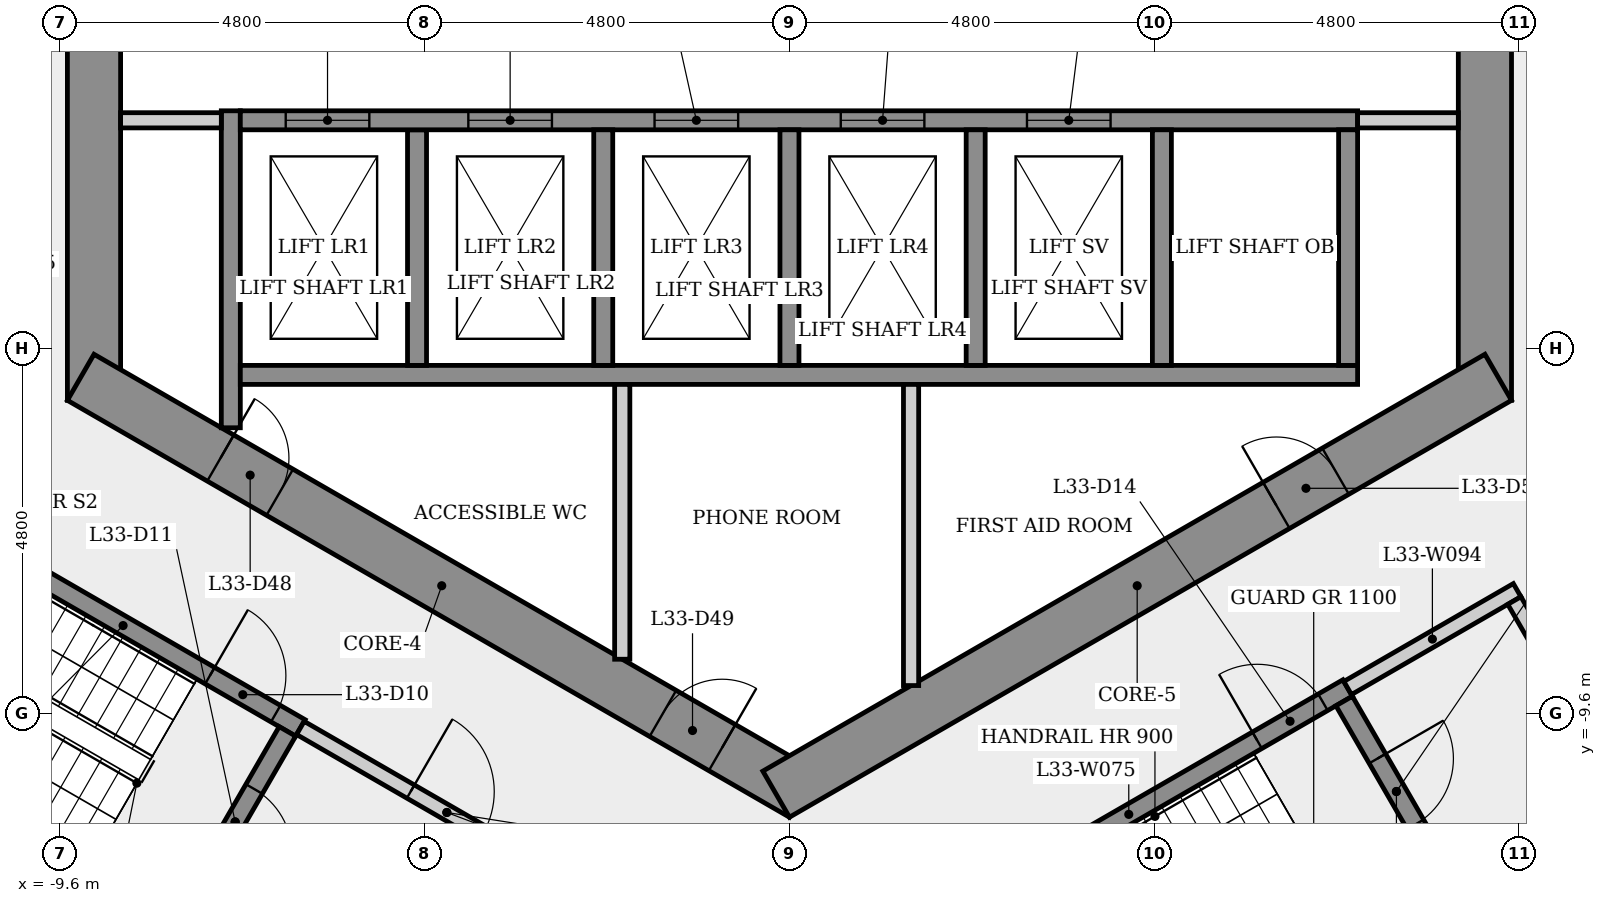
"""IFC4 building model, lengths in metres.
Left out: names, types, materials, properties, quantities, classifications, styles, units other than length and angle.
Written with IfcOpenShell. Run it as: python <this file> out.ifc"""

import sys

from ifc_helpers import new_model, si_unit, direction, frame, frame_2d, origin, place, context, subcontext, project, spatial, rectangle, extrude, element, fill, save


model = new_model("IFC4")
c1 = context("Model", 3, precision=1e-05, world=origin(), true_north=direction((0.0, 1.0)))
c2 = subcontext(c1, "Body", "Model", "MODEL_VIEW")
j1 = project(units=[si_unit("LENGTHUNIT", "METRE"), si_unit("PLANEANGLEUNIT", "RADIAN")], contexts=[c1])
p1 = place(None, origin())
s1 = spatial("IfcSite", under=j1, at=p1, CompositionType="ELEMENT")
p2 = place(p1, origin())
s2 = spatial("IfcBuilding", under=s1, at=p2, CompositionType="ELEMENT")
p3 = place(p2, frame((0.0, 0.0, 124.5)))
s3 = spatial("IfcBuildingStorey", under=s2, at=p3, CompositionType="ELEMENT", Elevation=124.5)
p4 = place(p3, frame((9.15, -5.485, 0.0), z_axis=(0.0, 0.0, 1.0), x_axis=(0.0, 1.0, 0.0)))
e1 = element("IfcWall", 1, at=p4, inside=s3, PredefinedType="SHEAR", context=c2, shape_type="SweptSolid", body=[
    extrude(rectangle(XDim=10.97, YDim=0.7, at=frame_2d((5.485, 0.0))), origin(), (0.0, 0.0, 1.0), 4.0),
])
p5 = place(p4, frame((4.685, 0.0, 0.0)))
e2 = element("IfcOpeningElement", 2, at=p5, cuts=e1, PredefinedType="OPENING", context=c2, shape_type="SweptSolid", body=[
    extrude(rectangle(XDim=1.6, YDim=2.1, at=frame_2d((0.8, 1.05))), frame((0.0, 0.36, 0.0), z_axis=(0.0, -1.0, 0.0), x_axis=(1.0, 0.0, 0.0)), (0.0, 0.0, 1.0), 0.72),
])
p6 = place(p3, frame((-9.15, 5.485, 0.0), z_axis=(0.0, 0.0, 1.0), x_axis=(0.0, -1.0, 0.0)))
e3 = element("IfcWall", 3, at=p6, inside=s3, PredefinedType="SHEAR", context=c2, shape_type="SweptSolid", body=[
    extrude(rectangle(XDim=10.97, YDim=0.7, at=frame_2d((5.485, 0.0))), origin(), (0.0, 0.0, 1.0), 4.0),
])
p7 = place(p6, frame((4.685, 0.0, 0.0)))
e4 = element("IfcOpeningElement", 4, at=p7, cuts=e3, PredefinedType="OPENING", context=c2, shape_type="SweptSolid", body=[
    extrude(rectangle(XDim=1.6, YDim=2.1, at=frame_2d((0.8, 1.05))), frame((0.0, 0.36, 0.0), z_axis=(0.0, -1.0, 0.0), x_axis=(1.0, 0.0, 0.0)), (0.0, 0.0, 1.0), 0.72),
])
p8 = place(p3, frame((-9.325, -5.182, 0.0), z_axis=(0.0, 0.0, 1.0), x_axis=(0.866023993627, -0.500002442456, 0.0)))
e5 = element("IfcWall", 5, at=p8, inside=s3, PredefinedType="SHEAR", context=c2, shape_type="SweptSolid", body=[
    extrude(rectangle(XDim=10.97, YDim=0.7, at=frame_2d((5.485, 0.0))), origin(), (0.0, 0.0, 1.0), 4.0),
])
p9 = place(p8, frame((2.125, 0.0, 0.0)))
e6 = element("IfcOpeningElement", 6, at=p9, cuts=e5, PredefinedType="OPENING", context=c2, shape_type="SweptSolid", body=[
    extrude(rectangle(XDim=0.9, YDim=2.1, at=frame_2d((0.45, 1.05))), frame((0.0, 0.36, 0.0), z_axis=(0.0, -1.0, 0.0), x_axis=(1.0, 0.0, 0.0)), (0.0, 0.0, 1.0), 0.72),
])
p10 = place(p8, frame((8.845, 0.0, 0.0)))
e7 = element("IfcOpeningElement", 7, at=p10, cuts=e5, PredefinedType="OPENING", context=c2, shape_type="SweptSolid", body=[
    extrude(rectangle(XDim=0.9, YDim=2.1, at=frame_2d((0.45, 1.05))), frame((0.0, 0.36, 0.0), z_axis=(0.0, -1.0, 0.0), x_axis=(1.0, 0.0, 0.0)), (0.0, 0.0, 1.0), 0.72),
])
p11 = place(p3, frame((-0.175, -10.667, 0.0), z_axis=(0.0, 0.0, 1.0), x_axis=(0.866023993627, 0.500002442456, 0.0)))
e8 = element("IfcWall", 8, at=p11, inside=s3, PredefinedType="SHEAR", context=c2, shape_type="SweptSolid", body=[
    extrude(rectangle(XDim=10.97, YDim=0.7, at=frame_2d((5.485, 0.0))), origin(), (0.0, 0.0, 1.0), 4.0),
])
p12 = place(p11, frame((7.599, 0.0, 0.0)))
e9 = element("IfcOpeningElement", 9, at=p12, cuts=e8, PredefinedType="OPENING", context=c2, shape_type="SweptSolid", body=[
    extrude(rectangle(XDim=0.9, YDim=2.1, at=frame_2d((0.45, 1.05))), frame((0.0, 0.36, 0.0), z_axis=(0.0, -1.0, 0.0), x_axis=(1.0, 0.0, 0.0)), (0.0, 0.0, 1.0), 0.72),
])
p13 = place(p3, frame((-11.1, -7.101, 0.0), z_axis=(0.0, 0.0, 1.0), x_axis=(0.866028615007, -0.499994437958, 0.0)))
e10 = element("IfcWall", 10, at=p13, inside=s3, PredefinedType="SHEAR", context=c2, shape_type="SweptSolid", body=[
    extrude(rectangle(XDim=5.387, YDim=0.25, at=frame_2d((2.694, 0.0))), origin(), (0.0, 0.0, 1.0), 3.6),
])
p14 = place(p13, frame((4.012, 0.0, 0.0)))
e11 = element("IfcOpeningElement", 11, at=p14, cuts=e10, PredefinedType="OPENING", context=c2, shape_type="SweptSolid", body=[
    extrude(rectangle(XDim=1.0, YDim=2.1, at=frame_2d((0.5, 1.05))), frame((0.0, 0.135, 0.0), z_axis=(0.0, -1.0, 0.0), x_axis=(1.0, 0.0, 0.0)), (0.0, 0.0, 1.0), 0.27),
])
p15 = place(p3, frame((-7.935, -12.393, 0.0), z_axis=(0.0, 0.0, 1.0), x_axis=(-0.866025499775, 0.499999833739, 0.0)))
e12 = element("IfcWall", 12, at=p15, inside=s3, PredefinedType="SHEAR", context=c2, shape_type="SweptSolid", body=[
    extrude(rectangle(XDim=6.4, YDim=0.25, at=frame_2d((3.2, 0.0))), origin(), (0.0, 0.0, 1.0), 3.6),
])
p16 = place(p3, frame((-7.35, -5.846, 0.0), z_axis=(0.0, 0.0, 1.0), x_axis=(0.0, 1.0, 0.0)))
e13 = element("IfcWall", 13, at=p16, inside=s3, PredefinedType="SHEAR", context=c2, shape_type="SweptSolid", body=[
    extrude(rectangle(XDim=4.171, YDim=0.25, at=frame_2d((2.085, 0.0))), origin(), (0.0, 0.0, 1.0), 3.6),
])
p17 = place(p3, frame((-7.475, -1.8, 0.0), z_axis=(0.0, 0.0, 1.0), x_axis=(-1.0, 0.0, 0.0)))
e14 = element("IfcWall", 14, at=p17, inside=s3, PredefinedType="PARTITIONING", context=c2, shape_type="SweptSolid", body=[
    extrude(rectangle(XDim=1.325, YDim=0.2, at=frame_2d((0.663, 0.0))), origin(), (0.0, 0.0, 1.0), 3.6),
])
p18 = place(p3, frame((-6.605, -9.841, 0.0), z_axis=(0.0, 0.0, 1.0), x_axis=(-0.499996545922, -0.866027397988, 0.0)))
e15 = element("IfcWall", 15, at=p18, inside=s3, PredefinedType="SHEAR", context=c2, shape_type="SweptSolid", body=[
    extrude(rectangle(XDim=2.75, YDim=0.25, at=frame_2d((1.375, 0.0))), origin(), (0.0, 0.0, 1.0), 3.6),
])
p19 = place(p18, frame((0.875, 0.0, 0.0)))
e16 = element("IfcOpeningElement", 16, at=p19, cuts=e15, PredefinedType="OPENING", context=c2, shape_type="SweptSolid", body=[
    extrude(rectangle(XDim=1.0, YDim=2.1, at=frame_2d((0.5, 1.05))), frame((0.0, 0.135, 0.0), z_axis=(0.0, -1.0, 0.0), x_axis=(1.0, 0.0, 0.0)), (0.0, 0.0, 1.0), 0.27),
])
p20 = place(p3, frame((-6.435, -9.795, 0.0), z_axis=(0.0, 0.0, 1.0), x_axis=(0.866012907634, -0.500021643343, 0.0)))
e17 = element("IfcWall", 17, at=p20, inside=s3, PredefinedType="PARTITIONING", context=c2, shape_type="SweptSolid", body=[
    extrude(rectangle(XDim=4.45, YDim=0.2, at=frame_2d((2.225, 0.0))), origin(), (0.0, 0.0, 1.0), 3.6),
])
p21 = place(p20, frame((1.675, 0.0, 0.0)))
e18 = element("IfcOpeningElement", 18, at=p21, cuts=e17, PredefinedType="OPENING", context=c2, shape_type="SweptSolid", body=[
    extrude(rectangle(XDim=1.1, YDim=2.1, at=frame_2d((0.55, 1.05))), frame((0.0, 0.11, 0.0), z_axis=(0.0, -1.0, 0.0), x_axis=(1.0, 0.0, 0.0)), (0.0, 0.0, 1.0), 0.22),
])
p22 = place(p3, frame((-7.225, -5.15, 0.0), z_axis=(0.0, 0.0, 1.0), x_axis=(1.0, 0.0, 0.0)))
e19 = element("IfcWall", 19, at=p22, inside=s3, PredefinedType="SHEAR", context=c2, shape_type="SweptSolid", body=[
    extrude(rectangle(XDim=14.7, YDim=0.25, at=frame_2d((7.35, 0.0))), origin(), (0.0, 0.0, 1.0), 3.6),
])
p23 = place(p3, frame((-4.9, -1.925, 0.0), z_axis=(0.0, 0.0, 1.0), x_axis=(0.0, -1.0, 0.0)))
e20 = element("IfcWall", 20, at=p23, inside=s3, PredefinedType="SHEAR", context=c2, shape_type="SweptSolid", body=[
    extrude(rectangle(XDim=3.1, YDim=0.25, at=frame_2d((1.55, 0.0))), origin(), (0.0, 0.0, 1.0), 4.0),
])
p24 = place(p3, frame((-7.225, -1.8, 0.0), z_axis=(0.0, 0.0, 1.0), x_axis=(1.0, 0.0, 0.0)))
e21 = element("IfcWall", 21, at=p24, inside=s3, PredefinedType="SHEAR", context=c2, shape_type="SweptSolid", body=[
    extrude(rectangle(XDim=14.7, YDim=0.25, at=frame_2d((7.35, 0.0))), origin(), (0.0, 0.0, 1.0), 3.6),
])
p25 = place(p24, frame((0.597, 0.0, 0.0)))
e22 = element("IfcOpeningElement", 22, at=p25, cuts=e21, PredefinedType="OPENING", context=c2, shape_type="SweptSolid", body=[
    extrude(rectangle(XDim=1.1, YDim=2.1, at=frame_2d((0.55, 1.05))), frame((0.0, 0.135, 0.0), z_axis=(0.0, -1.0, 0.0), x_axis=(1.0, 0.0, 0.0)), (0.0, 0.0, 1.0), 0.27),
])
p26 = place(p24, frame((3.0, 0.0, 0.0)))
e23 = element("IfcOpeningElement", 23, at=p26, cuts=e21, PredefinedType="OPENING", context=c2, shape_type="SweptSolid", body=[
    extrude(rectangle(XDim=1.1, YDim=2.1, at=frame_2d((0.55, 1.05))), frame((0.0, 0.135, 0.0), z_axis=(0.0, -1.0, 0.0), x_axis=(1.0, 0.0, 0.0)), (0.0, 0.0, 1.0), 0.27),
])
p27 = place(p24, frame((5.45, 0.0, 0.0)))
e24 = element("IfcOpeningElement", 24, at=p27, cuts=e21, PredefinedType="OPENING", context=c2, shape_type="SweptSolid", body=[
    extrude(rectangle(XDim=1.1, YDim=2.1, at=frame_2d((0.55, 1.05))), frame((0.0, 0.135, 0.0), z_axis=(0.0, -1.0, 0.0), x_axis=(1.0, 0.0, 0.0)), (0.0, 0.0, 1.0), 0.27),
])
p28 = place(p24, frame((7.9, 0.0, 0.0)))
e25 = element("IfcOpeningElement", 25, at=p28, cuts=e21, PredefinedType="OPENING", context=c2, shape_type="SweptSolid", body=[
    extrude(rectangle(XDim=1.1, YDim=2.1, at=frame_2d((0.55, 1.05))), frame((0.0, 0.135, 0.0), z_axis=(0.0, -1.0, 0.0), x_axis=(1.0, 0.0, 0.0)), (0.0, 0.0, 1.0), 0.27),
])
p29 = place(p24, frame((10.35, 0.0, 0.0)))
e26 = element("IfcOpeningElement", 26, at=p29, cuts=e21, PredefinedType="OPENING", context=c2, shape_type="SweptSolid", body=[
    extrude(rectangle(XDim=1.1, YDim=2.1, at=frame_2d((0.55, 1.05))), frame((0.0, 0.135, 0.0), z_axis=(0.0, -1.0, 0.0), x_axis=(1.0, 0.0, 0.0)), (0.0, 0.0, 1.0), 0.27),
])
p30 = place(p3, frame((-2.45, -1.925, 0.0), z_axis=(0.0, 0.0, 1.0), x_axis=(0.0, -1.0, 0.0)))
e27 = element("IfcWall", 27, at=p30, inside=s3, PredefinedType="SHEAR", context=c2, shape_type="SweptSolid", body=[
    extrude(rectangle(XDim=3.1, YDim=0.25, at=frame_2d((1.55, 0.0))), origin(), (0.0, 0.0, 1.0), 4.0),
])
p31 = place(p3, frame((-2.2, -5.275, 0.0), z_axis=(0.0, 0.0, 1.0), x_axis=(0.0, -1.0, 0.0)))
e28 = element("IfcWall", 28, at=p31, inside=s3, PredefinedType="PARTITIONING", context=c2, shape_type="SweptSolid", body=[
    extrude(rectangle(XDim=3.616, YDim=0.2, at=frame_2d((1.808, 0.0))), origin(), (0.0, 0.0, 1.0), 3.6),
])
p32 = place(p3, frame((0.0, -1.925, 0.0), z_axis=(0.0, 0.0, 1.0), x_axis=(0.0, -1.0, 0.0)))
e29 = element("IfcWall", 29, at=p32, inside=s3, PredefinedType="SHEAR", context=c2, shape_type="SweptSolid", body=[
    extrude(rectangle(XDim=3.1, YDim=0.25, at=frame_2d((1.55, 0.0))), origin(), (0.0, 0.0, 1.0), 4.0),
])
p33 = place(p3, frame((1.6, -5.275, 0.0), z_axis=(0.0, 0.0, 1.0), x_axis=(0.0, -1.0, 0.0)))
e30 = element("IfcWall", 30, at=p33, inside=s3, PredefinedType="PARTITIONING", context=c2, shape_type="SweptSolid", body=[
    extrude(rectangle(XDim=3.963, YDim=0.2, at=frame_2d((1.981, 0.0))), origin(), (0.0, 0.0, 1.0), 3.6),
])
p34 = place(p3, frame((1.585, -12.595, 0.0), z_axis=(0.0, 0.0, 1.0), x_axis=(0.866036417653, 0.499980922934, 0.0)))
e31 = element("IfcWall", 31, at=p34, inside=s3, PredefinedType="SHEAR", context=c2, shape_type="SweptSolid", body=[
    extrude(rectangle(XDim=6.65, YDim=0.25, at=frame_2d((3.325, 0.0))), origin(), (0.0, 0.0, 1.0), 3.6),
])
p35 = place(p34, frame((5.275, 0.0, 0.0)))
e32 = element("IfcOpeningElement", 32, at=p35, cuts=e31, PredefinedType="OPENING", context=c2, shape_type="SweptSolid", body=[
    extrude(rectangle(XDim=1.0, YDim=2.1, at=frame_2d((0.5, 1.05))), frame((0.0, 0.135, 0.0), z_axis=(0.0, -1.0, 0.0), x_axis=(1.0, 0.0, 0.0)), (0.0, 0.0, 1.0), 0.27),
])
for number, where, z_axis, x_axis in (
    (33, (2.45, -1.925, 0.0), (0.0, 0.0, 1.0), (0.0, -1.0, 0.0)),
    (34, (4.9, -1.925, 0.0), (0.0, 0.0, 1.0), (0.0, -1.0, 0.0)),
):
    element("IfcWall", number, at=place(p3, frame(where, z_axis=z_axis, x_axis=x_axis)), inside=s3, PredefinedType="SHEAR", context=c2, shape_type="SweptSolid", body=[
        extrude(rectangle(XDim=3.1, YDim=0.25, at=frame_2d((1.55, 0.0))), origin(), (0.0, 0.0, 1.0), 4.0),
    ])
p36 = place(p3, frame((7.298, -9.441, 0.0), z_axis=(0.0, 0.0, 1.0), x_axis=(0.500034990121, -0.866005201286, 0.0)))
e35 = element("IfcWall", 35, at=p36, inside=s3, PredefinedType="SHEAR", context=c2, shape_type="SweptSolid", body=[
    extrude(rectangle(XDim=2.75, YDim=0.25, at=frame_2d((1.375, 0.0))), origin(), (0.0, 0.0, 1.0), 3.6),
])
p37 = place(p36, frame((0.875, 0.0, 0.0)))
e36 = element("IfcOpeningElement", 36, at=p37, cuts=e35, PredefinedType="OPENING", context=c2, shape_type="SweptSolid", body=[
    extrude(rectangle(XDim=1.0, YDim=2.1, at=frame_2d((0.5, 1.05))), frame((0.0, 0.135, 0.0), z_axis=(0.0, -1.0, 0.0), x_axis=(1.0, 0.0, 0.0)), (0.0, 0.0, 1.0), 0.27),
])
p38 = place(p3, frame((7.344, -9.27, 0.0), z_axis=(0.0, 0.0, 1.0), x_axis=(0.866005588531, 0.500034319456, 0.0)))
e37 = element("IfcWall", 37, at=p38, inside=s3, PredefinedType="PARTITIONING", context=c2, shape_type="SweptSolid", body=[
    extrude(rectangle(XDim=2.575, YDim=0.2, at=frame_2d((1.288, 0.0))), origin(), (0.0, 0.0, 1.0), 3.6),
])
p39 = place(p3, frame((7.35, -1.925, 0.0), z_axis=(0.0, 0.0, 1.0), x_axis=(0.0, -1.0, 0.0)))
e38 = element("IfcWall", 38, at=p39, inside=s3, PredefinedType="SHEAR", context=c2, shape_type="SweptSolid", body=[
    extrude(rectangle(XDim=3.1, YDim=0.25, at=frame_2d((1.55, 0.0))), origin(), (0.0, 0.0, 1.0), 4.0),
])
p40 = place(p3, frame((8.8, -1.8, 0.0), z_axis=(0.0, 0.0, 1.0), x_axis=(-1.0, 0.0, 0.0)))
e39 = element("IfcWall", 39, at=p40, inside=s3, PredefinedType="PARTITIONING", context=c2, shape_type="SweptSolid", body=[
    extrude(rectangle(XDim=1.325, YDim=0.2, at=frame_2d((0.663, 0.0))), origin(), (0.0, 0.0, 1.0), 3.6),
])
p41 = place(p3, frame((9.537, -8.119, 0.0), z_axis=(0.0, 0.0, 1.0), x_axis=(0.499990139034, -0.866031096941, 0.0)))
e40 = element("IfcWall", 40, at=p41, inside=s3, PredefinedType="PARTITIONING", context=c2, shape_type="SweptSolid", body=[
    extrude(rectangle(XDim=3.0, YDim=0.2, at=frame_2d((1.5, 0.0))), origin(), (0.0, 0.0, 1.0), 3.6),
])
p42 = place(p41, frame((0.935, 0.0, 0.0)))
e41 = element("IfcOpeningElement", 41, at=p42, cuts=e40, PredefinedType="OPENING", context=c2, shape_type="SweptSolid", body=[
    extrude(rectangle(XDim=1.0, YDim=2.1, at=frame_2d((0.5, 1.05))), frame((0.0, 0.11, 0.0), z_axis=(0.0, -1.0, 0.0), x_axis=(1.0, 0.0, 0.0)), (0.0, 0.0, 1.0), 0.22),
])
p43 = place(p3, frame((10.901, -10.681, 0.0), z_axis=(0.0, 0.0, 1.0), x_axis=(-0.866007538022, -0.500030943131, 0.0)))
e42 = element("IfcWall", 42, at=p43, inside=s3, PredefinedType="PLUMBINGWALL", context=c2, shape_type="SweptSolid", body=[
    extrude(rectangle(XDim=2.375, YDim=0.2, at=frame_2d((1.188, 0.0))), origin(), (0.0, 0.0, 1.0), 3.6),
])
p44 = place(p25, origin())
e43 = element("IfcDoor", 43, at=p44, inside=s3, OperationType="SLIDING_TO_LEFT", PredefinedType="DOOR", context=c2, shape_type="SweptSolid", body=[
    extrude(rectangle(XDim=1.1, YDim=2.1, at=frame_2d((0.55, 1.05))), frame((0.0, 0.025, 0.0), z_axis=(0.0, -1.0, 0.0), x_axis=(1.0, 0.0, 0.0)), (0.0, 0.0, 1.0), 0.05),
])
fill(e22, e43)
p45 = place(p26, origin())
e44 = element("IfcDoor", 44, at=p45, inside=s3, OperationType="SLIDING_TO_LEFT", PredefinedType="DOOR", context=c2, shape_type="SweptSolid", body=[
    extrude(rectangle(XDim=1.1, YDim=2.1, at=frame_2d((0.55, 1.05))), frame((0.0, 0.025, 0.0), z_axis=(0.0, -1.0, 0.0), x_axis=(1.0, 0.0, 0.0)), (0.0, 0.0, 1.0), 0.05),
])
fill(e23, e44)
p46 = place(p27, origin())
e45 = element("IfcDoor", 45, at=p46, inside=s3, OperationType="SLIDING_TO_LEFT", PredefinedType="DOOR", context=c2, shape_type="SweptSolid", body=[
    extrude(rectangle(XDim=1.1, YDim=2.1, at=frame_2d((0.55, 1.05))), frame((0.0, 0.025, 0.0), z_axis=(0.0, -1.0, 0.0), x_axis=(1.0, 0.0, 0.0)), (0.0, 0.0, 1.0), 0.05),
])
fill(e24, e45)
p47 = place(p28, origin())
e46 = element("IfcDoor", 46, at=p47, inside=s3, OperationType="SLIDING_TO_LEFT", PredefinedType="DOOR", context=c2, shape_type="SweptSolid", body=[
    extrude(rectangle(XDim=1.1, YDim=2.1, at=frame_2d((0.55, 1.05))), frame((0.0, 0.025, 0.0), z_axis=(0.0, -1.0, 0.0), x_axis=(1.0, 0.0, 0.0)), (0.0, 0.0, 1.0), 0.05),
])
fill(e25, e46)
p48 = place(p29, origin())
e47 = element("IfcDoor", 47, at=p48, inside=s3, OperationType="SLIDING_TO_LEFT", PredefinedType="DOOR", context=c2, shape_type="SweptSolid", body=[
    extrude(rectangle(XDim=1.1, YDim=2.1, at=frame_2d((0.55, 1.05))), frame((0.0, 0.025, 0.0), z_axis=(0.0, -1.0, 0.0), x_axis=(1.0, 0.0, 0.0)), (0.0, 0.0, 1.0), 0.05),
])
fill(e26, e47)
p49 = place(p14, origin())
e48 = element("IfcDoor", 48, at=p49, inside=s3, OperationType="SINGLE_SWING_LEFT", PredefinedType="DOOR", context=c2, shape_type="SweptSolid", body=[
    extrude(rectangle(XDim=1.0, YDim=2.1, at=frame_2d((0.5, 1.05))), frame((0.0, 0.025, 0.0), z_axis=(0.0, -1.0, 0.0), x_axis=(1.0, 0.0, 0.0)), (0.0, 0.0, 1.0), 0.05),
])
fill(e11, e48)
p50 = place(p19, origin())
e49 = element("IfcDoor", 49, at=p50, inside=s3, OperationType="SINGLE_SWING_RIGHT", PredefinedType="DOOR", context=c2, shape_type="SweptSolid", body=[
    extrude(rectangle(XDim=1.0, YDim=2.1, at=frame_2d((0.5, 1.05))), frame((0.0, 0.025, 0.0), z_axis=(0.0, -1.0, 0.0), x_axis=(1.0, 0.0, 0.0)), (0.0, 0.0, 1.0), 0.05),
])
fill(e16, e49)
p51 = place(p21, origin())
e50 = element("IfcDoor", 50, at=p51, inside=s3, OperationType="SINGLE_SWING_LEFT", PredefinedType="DOOR", context=c2, shape_type="SweptSolid", body=[
    extrude(rectangle(XDim=1.1, YDim=2.1, at=frame_2d((0.55, 1.05))), frame((0.0, 0.025, 0.0), z_axis=(0.0, -1.0, 0.0), x_axis=(1.0, 0.0, 0.0)), (0.0, 0.0, 1.0), 0.05),
])
fill(e18, e50)
p52 = place(p35, origin())
e51 = element("IfcDoor", 51, at=p52, inside=s3, OperationType="SINGLE_SWING_LEFT", PredefinedType="DOOR", context=c2, shape_type="SweptSolid", body=[
    extrude(rectangle(XDim=1.0, YDim=2.1, at=frame_2d((0.5, 1.05))), frame((0.0, 0.025, 0.0), z_axis=(0.0, -1.0, 0.0), x_axis=(1.0, 0.0, 0.0)), (0.0, 0.0, 1.0), 0.05),
])
fill(e32, e51)
p53 = place(p37, origin())
e52 = element("IfcDoor", 52, at=p53, inside=s3, OperationType="SINGLE_SWING_LEFT", PredefinedType="DOOR", context=c2, shape_type="SweptSolid", body=[
    extrude(rectangle(XDim=1.0, YDim=2.1, at=frame_2d((0.5, 1.05))), frame((0.0, 0.025, 0.0), z_axis=(0.0, -1.0, 0.0), x_axis=(1.0, 0.0, 0.0)), (0.0, 0.0, 1.0), 0.05),
])
fill(e36, e52)
p54 = place(p9, origin())
e53 = element("IfcDoor", 53, at=p54, inside=s3, OperationType="SINGLE_SWING_LEFT", PredefinedType="DOOR", context=c2, shape_type="SweptSolid", body=[
    extrude(rectangle(XDim=0.9, YDim=2.1, at=frame_2d((0.45, 1.05))), frame((0.0, 0.025, 0.0), z_axis=(0.0, -1.0, 0.0), x_axis=(1.0, 0.0, 0.0)), (0.0, 0.0, 1.0), 0.05),
])
fill(e6, e53)
p55 = place(p10, origin())
e54 = element("IfcDoor", 54, at=p55, inside=s3, OperationType="SINGLE_SWING_RIGHT", PredefinedType="DOOR", context=c2, shape_type="SweptSolid", body=[
    extrude(rectangle(XDim=0.9, YDim=2.1, at=frame_2d((0.45, 1.05))), frame((0.0, 0.025, 0.0), z_axis=(0.0, -1.0, 0.0), x_axis=(1.0, 0.0, 0.0)), (0.0, 0.0, 1.0), 0.05),
])
fill(e7, e54)
p56 = place(p12, origin())
e55 = element("IfcDoor", 55, at=p56, inside=s3, OperationType="SINGLE_SWING_LEFT", PredefinedType="DOOR", context=c2, shape_type="SweptSolid", body=[
    extrude(rectangle(XDim=0.9, YDim=2.1, at=frame_2d((0.45, 1.05))), frame((0.0, 0.025, 0.0), z_axis=(0.0, -1.0, 0.0), x_axis=(1.0, 0.0, 0.0)), (0.0, 0.0, 1.0), 0.05),
])
fill(e9, e55)
save(model, sys.argv[1])
